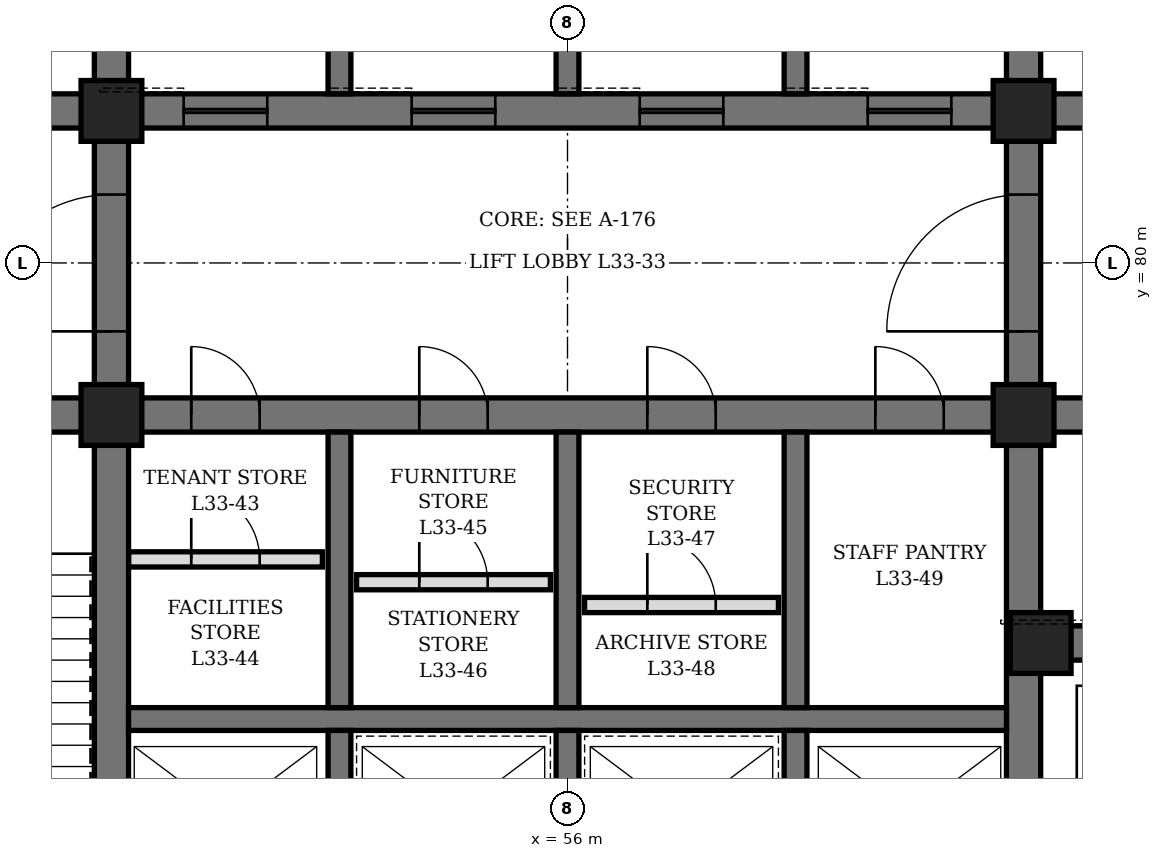
"""IFC4 building model, lengths in metres.
Left out: names, types, materials, properties, quantities, classifications, styles, units other than length and angle.
Written with IfcOpenShell. Run it as: python <this file> out.ifc"""

import sys

from ifc_helpers import new_model, si_unit, direction, frame, frame_2d, origin, origin_2d, place, context, subcontext, project, spatial, rectangle, hollow_rectangle, extrude, element, fill, save


model = new_model("IFC4")
c1 = context("Model", 3, precision=1e-05, world=origin(), true_north=direction((0.0, 1.0)))
c2 = subcontext(c1, "Body", "Model", "MODEL_VIEW")
j1 = project(units=[si_unit("LENGTHUNIT", "METRE"), si_unit("PLANEANGLEUNIT", "RADIAN")], contexts=[c1])
p1 = place(None, origin())
s1 = spatial("IfcSite", under=j1, at=p1, CompositionType="ELEMENT")
p2 = place(p1, origin())
s2 = spatial("IfcBuilding", under=s1, at=p2, CompositionType="ELEMENT")
p3 = place(p2, frame((0.0, 0.0, 150.1)))
s3 = spatial("IfcBuildingStorey", under=s2, at=p3, CompositionType="ELEMENT", Elevation=150.1)
p4 = place(p3, frame((50.0, 71.6, 0.0), z_axis=(0.0, 0.0, 1.0), x_axis=(0.0, 1.0, 0.0)))
e1 = element("IfcWall", 1, at=p4, inside=s3, PredefinedType="SHEAR", context=c2, shape_type="SweptSolid", body=[
    extrude(rectangle(XDim=16.8, YDim=0.45, at=frame_2d((8.4, 0.0))), origin(), (0.0, 0.0, 1.0), 4.2),
])
p5 = place(p4, frame((7.5, 0.0, 0.0)))
e2 = element("IfcOpeningElement", 2, at=p5, cuts=e1, PredefinedType="OPENING", context=c2, shape_type="SweptSolid", body=[
    extrude(rectangle(XDim=1.8, YDim=2.4, at=frame_2d((0.9, 1.2))), frame((0.0, 0.235, 0.0), z_axis=(0.0, -1.0, 0.0), x_axis=(1.0, 0.0, 0.0)), (0.0, 0.0, 1.0), 0.47),
])
p6 = place(p3, frame((62.0, 71.6, 0.0), z_axis=(0.0, 0.0, 1.0), x_axis=(0.0, 1.0, 0.0)))
e3 = element("IfcWall", 3, at=p6, inside=s3, PredefinedType="SHEAR", context=c2, shape_type="SweptSolid", body=[
    extrude(rectangle(XDim=16.8, YDim=0.45, at=frame_2d((8.4, 0.0))), origin(), (0.0, 0.0, 1.0), 4.2),
])
p7 = place(p6, frame((7.5, 0.0, 0.0)))
e4 = element("IfcOpeningElement", 4, at=p7, cuts=e3, PredefinedType="OPENING", context=c2, shape_type="SweptSolid", body=[
    extrude(rectangle(XDim=1.8, YDim=2.4, at=frame_2d((0.9, 1.2))), frame((0.0, 0.235, 0.0), z_axis=(0.0, -1.0, 0.0), x_axis=(1.0, 0.0, 0.0)), (0.0, 0.0, 1.0), 0.47),
])
p8 = place(p3, frame((44.6, 78.0, 0.0), z_axis=(0.0, 0.0, 1.0), x_axis=(1.0, 0.0, 0.0)))
e5 = element("IfcWall", 5, at=p8, inside=s3, PredefinedType="SHEAR", context=c2, shape_type="SweptSolid", body=[
    extrude(rectangle(XDim=5.175, YDim=0.45, at=frame_2d((2.587, 0.0))), origin(), (0.0, 0.0, 1.0), 4.2),
])
p9 = place(p8, frame((1.8, 0.0, 0.0)))
e6 = element("IfcOpeningElement", 6, at=p9, cuts=e5, PredefinedType="OPENING", context=c2, shape_type="SweptSolid", body=[
    extrude(rectangle(XDim=1.2, YDim=2.1, at=frame_2d((0.6, 1.05))), frame((0.0, 0.235, 0.0), z_axis=(0.0, -1.0, 0.0), x_axis=(1.0, 0.0, 0.0)), (0.0, 0.0, 1.0), 0.47),
])
p10 = place(p3, frame((44.6, 82.0, 0.0), z_axis=(0.0, 0.0, 1.0), x_axis=(1.0, 0.0, 0.0)))
e7 = element("IfcWall", 7, at=p10, inside=s3, PredefinedType="SHEAR", context=c2, shape_type="SweptSolid", body=[
    extrude(rectangle(XDim=5.175, YDim=0.45, at=frame_2d((2.587, 0.0))), origin(), (0.0, 0.0, 1.0), 4.2),
])
p11 = place(p10, frame((0.7, 0.0, 0.0)))
e8 = element("IfcOpeningElement", 8, at=p11, cuts=e7, PredefinedType="OPENING", context=c2, shape_type="SweptSolid", body=[
    extrude(rectangle(XDim=0.9, YDim=2.1, at=frame_2d((0.45, 1.05))), frame((0.0, 0.235, 0.0), z_axis=(0.0, -1.0, 0.0), x_axis=(1.0, 0.0, 0.0)), (0.0, 0.0, 1.0), 0.47),
])
p12 = place(p3, frame((62.225, 75.0, 0.0), z_axis=(0.0, 0.0, 1.0), x_axis=(1.0, 0.0, 0.0)))
e9 = element("IfcWall", 9, at=p12, inside=s3, PredefinedType="SHEAR", context=c2, shape_type="SweptSolid", body=[
    extrude(rectangle(XDim=5.175, YDim=0.45, at=frame_2d((2.587, 0.0))), origin(), (0.0, 0.0, 1.0), 4.2),
])
p13 = place(p12, frame((0.675, 0.0, 0.0)))
e10 = element("IfcOpeningElement", 10, at=p13, cuts=e9, PredefinedType="OPENING", context=c2, shape_type="SweptSolid", body=[
    extrude(rectangle(XDim=1.2, YDim=2.2, at=frame_2d((0.6, 1.1))), frame((0.0, 0.235, 0.0), z_axis=(0.0, -1.0, 0.0), x_axis=(1.0, 0.0, 0.0)), (0.0, 0.0, 1.0), 0.47),
])
p14 = place(p12, frame((3.425, 0.0, 0.0)))
e11 = element("IfcOpeningElement", 11, at=p14, cuts=e9, PredefinedType="OPENING", context=c2, shape_type="SweptSolid", body=[
    extrude(rectangle(XDim=1.2, YDim=2.2, at=frame_2d((0.6, 1.1))), frame((0.0, 0.235, 0.0), z_axis=(0.0, -1.0, 0.0), x_axis=(1.0, 0.0, 0.0)), (0.0, 0.0, 1.0), 0.47),
])
p15 = place(p3, frame((62.225, 78.0, 0.0), z_axis=(0.0, 0.0, 1.0), x_axis=(1.0, 0.0, 0.0)))
e12 = element("IfcWall", 12, at=p15, inside=s3, PredefinedType="SHEAR", context=c2, shape_type="SweptSolid", body=[
    extrude(rectangle(XDim=5.175, YDim=0.45, at=frame_2d((2.587, 0.0))), origin(), (0.0, 0.0, 1.0), 4.2),
])
p16 = place(p15, frame((2.175, 0.0, 0.0)))
e13 = element("IfcOpeningElement", 13, at=p16, cuts=e12, PredefinedType="OPENING", context=c2, shape_type="SweptSolid", body=[
    extrude(rectangle(XDim=1.2, YDim=2.1, at=frame_2d((0.6, 1.05))), frame((0.0, 0.235, 0.0), z_axis=(0.0, -1.0, 0.0), x_axis=(1.0, 0.0, 0.0)), (0.0, 0.0, 1.0), 0.47),
])
p17 = place(p3, frame((62.225, 82.0, 0.0), z_axis=(0.0, 0.0, 1.0), x_axis=(1.0, 0.0, 0.0)))
e14 = element("IfcWall", 14, at=p17, inside=s3, PredefinedType="SHEAR", context=c2, shape_type="SweptSolid", body=[
    extrude(rectangle(XDim=5.175, YDim=0.45, at=frame_2d((2.587, 0.0))), origin(), (0.0, 0.0, 1.0), 4.2),
])
p18 = place(p17, frame((2.175, 0.0, 0.0)))
e15 = element("IfcOpeningElement", 15, at=p18, cuts=e14, PredefinedType="OPENING", context=c2, shape_type="SweptSolid", body=[
    extrude(rectangle(XDim=1.2, YDim=2.1, at=frame_2d((0.6, 1.05))), frame((0.0, 0.235, 0.0), z_axis=(0.0, -1.0, 0.0), x_axis=(1.0, 0.0, 0.0)), (0.0, 0.0, 1.0), 0.47),
])
p19 = place(p3, frame((50.225, 78.0, 0.0), z_axis=(0.0, 0.0, 1.0), x_axis=(1.0, 0.0, 0.0)))
e16 = element("IfcWall", 16, at=p19, inside=s3, PredefinedType="SHEAR", context=c2, shape_type="SweptSolid", body=[
    extrude(rectangle(XDim=11.55, YDim=0.45, at=frame_2d((5.775, 0.0))), origin(), (0.0, 0.0, 1.0), 4.2),
])
p20 = place(p19, frame((0.825, 0.0, 0.0)))
e17 = element("IfcOpeningElement", 17, at=p20, cuts=e16, PredefinedType="OPENING", context=c2, shape_type="SweptSolid", body=[
    extrude(rectangle(XDim=0.9, YDim=2.1, at=frame_2d((0.45, 1.05))), frame((0.0, 0.235, 0.0), z_axis=(0.0, -1.0, 0.0), x_axis=(1.0, 0.0, 0.0)), (0.0, 0.0, 1.0), 0.47),
])
p21 = place(p19, frame((3.825, 0.0, 0.0)))
e18 = element("IfcOpeningElement", 18, at=p21, cuts=e16, PredefinedType="OPENING", context=c2, shape_type="SweptSolid", body=[
    extrude(rectangle(XDim=0.9, YDim=2.1, at=frame_2d((0.45, 1.05))), frame((0.0, 0.235, 0.0), z_axis=(0.0, -1.0, 0.0), x_axis=(1.0, 0.0, 0.0)), (0.0, 0.0, 1.0), 0.47),
])
p22 = place(p19, frame((6.825, 0.0, 0.0)))
e19 = element("IfcOpeningElement", 19, at=p22, cuts=e16, PredefinedType="OPENING", context=c2, shape_type="SweptSolid", body=[
    extrude(rectangle(XDim=0.9, YDim=2.1, at=frame_2d((0.45, 1.05))), frame((0.0, 0.235, 0.0), z_axis=(0.0, -1.0, 0.0), x_axis=(1.0, 0.0, 0.0)), (0.0, 0.0, 1.0), 0.47),
])
p23 = place(p19, frame((9.825, 0.0, 0.0)))
e20 = element("IfcOpeningElement", 20, at=p23, cuts=e16, PredefinedType="OPENING", context=c2, shape_type="SweptSolid", body=[
    extrude(rectangle(XDim=0.9, YDim=2.1, at=frame_2d((0.45, 1.05))), frame((0.0, 0.235, 0.0), z_axis=(0.0, -1.0, 0.0), x_axis=(1.0, 0.0, 0.0)), (0.0, 0.0, 1.0), 0.47),
])
p24 = place(p3, frame((50.225, 82.0, 0.0), z_axis=(0.0, 0.0, 1.0), x_axis=(1.0, 0.0, 0.0)))
e21 = element("IfcWall", 21, at=p24, inside=s3, PredefinedType="SHEAR", context=c2, shape_type="SweptSolid", body=[
    extrude(rectangle(XDim=11.55, YDim=0.45, at=frame_2d((5.775, 0.0))), origin(), (0.0, 0.0, 1.0), 4.2),
])
p25 = place(p24, frame((0.725, 0.0, 0.0)))
e22 = element("IfcOpeningElement", 22, at=p25, cuts=e21, PredefinedType="OPENING", context=c2, shape_type="SweptSolid", body=[
    extrude(rectangle(XDim=1.1, YDim=2.2, at=frame_2d((0.55, 1.1))), frame((0.0, 0.235, 0.0), z_axis=(0.0, -1.0, 0.0), x_axis=(1.0, 0.0, 0.0)), (0.0, 0.0, 1.0), 0.47),
])
p26 = place(p24, frame((3.725, 0.0, 0.0)))
e23 = element("IfcOpeningElement", 23, at=p26, cuts=e21, PredefinedType="OPENING", context=c2, shape_type="SweptSolid", body=[
    extrude(rectangle(XDim=1.1, YDim=2.2, at=frame_2d((0.55, 1.1))), frame((0.0, 0.235, 0.0), z_axis=(0.0, -1.0, 0.0), x_axis=(1.0, 0.0, 0.0)), (0.0, 0.0, 1.0), 0.47),
])
p27 = place(p24, frame((6.725, 0.0, 0.0)))
e24 = element("IfcOpeningElement", 24, at=p27, cuts=e21, PredefinedType="OPENING", context=c2, shape_type="SweptSolid", body=[
    extrude(rectangle(XDim=1.1, YDim=2.2, at=frame_2d((0.55, 1.1))), frame((0.0, 0.235, 0.0), z_axis=(0.0, -1.0, 0.0), x_axis=(1.0, 0.0, 0.0)), (0.0, 0.0, 1.0), 0.47),
])
p28 = place(p24, frame((9.725, 0.0, 0.0)))
e25 = element("IfcOpeningElement", 25, at=p28, cuts=e21, PredefinedType="OPENING", context=c2, shape_type="SweptSolid", body=[
    extrude(rectangle(XDim=1.1, YDim=2.2, at=frame_2d((0.55, 1.1))), frame((0.0, 0.235, 0.0), z_axis=(0.0, -1.0, 0.0), x_axis=(1.0, 0.0, 0.0)), (0.0, 0.0, 1.0), 0.47),
])
p29 = place(p3, frame((50.225, 74.0, 0.0), z_axis=(0.0, 0.0, 1.0), x_axis=(1.0, 0.0, 0.0)))
e26 = element("IfcWall", 26, at=p29, inside=s3, PredefinedType="SHEAR", context=c2, shape_type="SweptSolid", body=[
    extrude(rectangle(XDim=11.55, YDim=0.3, at=frame_2d((5.775, 0.0))), origin(), (0.0, 0.0, 1.0), 4.2),
])
p30 = place(p3, frame((53.0, 71.6, 0.0), z_axis=(0.0, 0.0, 1.0), x_axis=(0.0, 1.0, 0.0)))
e27 = element("IfcWall", 27, at=p30, inside=s3, PredefinedType="SHEAR", context=c2, shape_type="SweptSolid", body=[
    extrude(rectangle(XDim=2.25, YDim=0.3, at=frame_2d((1.125, 0.0))), origin(), (0.0, 0.0, 1.0), 4.2),
])
p31 = place(p3, frame((53.0, 74.15, 0.0), z_axis=(0.0, 0.0, 1.0), x_axis=(0.0, 1.0, 0.0)))
e28 = element("IfcWall", 28, at=p31, inside=s3, PredefinedType="SHEAR", context=c2, shape_type="SweptSolid", body=[
    extrude(rectangle(XDim=3.625, YDim=0.3, at=frame_2d((1.812, 0.0))), origin(), (0.0, 0.0, 1.0), 4.2),
])
p32 = place(p3, frame((53.0, 82.225, 0.0), z_axis=(0.0, 0.0, 1.0), x_axis=(0.0, 1.0, 0.0)))
e29 = element("IfcWall", 29, at=p32, inside=s3, PredefinedType="SHEAR", context=c2, shape_type="SweptSolid", body=[
    extrude(rectangle(XDim=3.55, YDim=0.3, at=frame_2d((1.775, 0.0))), origin(), (0.0, 0.0, 1.0), 4.2),
])
p33 = place(p3, frame((56.0, 71.6, 0.0), z_axis=(0.0, 0.0, 1.0), x_axis=(0.0, 1.0, 0.0)))
e30 = element("IfcWall", 30, at=p33, inside=s3, PredefinedType="SHEAR", context=c2, shape_type="SweptSolid", body=[
    extrude(rectangle(XDim=2.25, YDim=0.3, at=frame_2d((1.125, 0.0))), origin(), (0.0, 0.0, 1.0), 4.2),
])
p34 = place(p3, frame((56.0, 74.15, 0.0), z_axis=(0.0, 0.0, 1.0), x_axis=(0.0, 1.0, 0.0)))
e31 = element("IfcWall", 31, at=p34, inside=s3, PredefinedType="SHEAR", context=c2, shape_type="SweptSolid", body=[
    extrude(rectangle(XDim=3.625, YDim=0.3, at=frame_2d((1.812, 0.0))), origin(), (0.0, 0.0, 1.0), 4.2),
])
p35 = place(p3, frame((56.0, 82.225, 0.0), z_axis=(0.0, 0.0, 1.0), x_axis=(0.0, 1.0, 0.0)))
e32 = element("IfcWall", 32, at=p35, inside=s3, PredefinedType="SHEAR", context=c2, shape_type="SweptSolid", body=[
    extrude(rectangle(XDim=3.55, YDim=0.3, at=frame_2d((1.775, 0.0))), origin(), (0.0, 0.0, 1.0), 4.2),
])
p36 = place(p3, frame((59.0, 71.6, 0.0), z_axis=(0.0, 0.0, 1.0), x_axis=(0.0, 1.0, 0.0)))
e33 = element("IfcWall", 33, at=p36, inside=s3, PredefinedType="SHEAR", context=c2, shape_type="SweptSolid", body=[
    extrude(rectangle(XDim=2.25, YDim=0.3, at=frame_2d((1.125, 0.0))), origin(), (0.0, 0.0, 1.0), 4.2),
])
p37 = place(p3, frame((59.0, 74.15, 0.0), z_axis=(0.0, 0.0, 1.0), x_axis=(0.0, 1.0, 0.0)))
e34 = element("IfcWall", 34, at=p37, inside=s3, PredefinedType="SHEAR", context=c2, shape_type="SweptSolid", body=[
    extrude(rectangle(XDim=3.625, YDim=0.3, at=frame_2d((1.812, 0.0))), origin(), (0.0, 0.0, 1.0), 4.2),
])
p38 = place(p3, frame((59.0, 82.225, 0.0), z_axis=(0.0, 0.0, 1.0), x_axis=(0.0, 1.0, 0.0)))
e35 = element("IfcWall", 35, at=p38, inside=s3, PredefinedType="SHEAR", context=c2, shape_type="SweptSolid", body=[
    extrude(rectangle(XDim=3.55, YDim=0.3, at=frame_2d((1.775, 0.0))), origin(), (0.0, 0.0, 1.0), 4.2),
])
for number, where, z_axis, x_axis in (
    (36, (50.0, 78.0, 0.0), (0.0, 0.0, 1.0), (1.0, 0.0, 0.0)),
    (37, (50.0, 82.0, 0.0), (0.0, 0.0, 1.0), (1.0, 0.0, 0.0)),
    (38, (62.0, 78.0, 0.0), (0.0, 0.0, 1.0), (1.0, 0.0, 0.0)),
    (39, (62.0, 82.0, 0.0), (0.0, 0.0, 1.0), (1.0, 0.0, 0.0)),
    (40, (62.225, 75.0, 0.0), (0.0, 0.0, 1.0), (1.0, 0.0, 0.0)),
):
    element("IfcColumn", number, at=place(p3, frame(where, z_axis=z_axis, x_axis=x_axis)), inside=s3, PredefinedType="COLUMN", context=c2, shape_type="SweptSolid", body=[
        extrude(hollow_rectangle(XDim=0.8, YDim=0.8, WallThickness=0.1, at=origin_2d()), origin(), (0.0, 0.0, 1.0), 4.2),
    ])
p39 = place(p3, frame((50.225, 76.1, 0.0), z_axis=(0.0, 0.0, 1.0), x_axis=(1.0, 0.0, 0.0)))
e41 = element("IfcWall", 41, at=p39, inside=s3, PredefinedType="PARTITIONING", context=c2, shape_type="SweptSolid", body=[
    extrude(rectangle(XDim=2.55, YDim=0.2, at=frame_2d((1.275, 0.0))), origin(), (0.0, 0.0, 1.0), 4.04),
])
p40 = place(p39, frame((0.825, 0.0, 0.0)))
e42 = element("IfcOpeningElement", 42, at=p40, cuts=e41, PredefinedType="OPENING", context=c2, shape_type="SweptSolid", body=[
    extrude(rectangle(XDim=0.9, YDim=2.1, at=frame_2d((0.45, 1.05))), frame((0.0, 0.11, 0.0), z_axis=(0.0, -1.0, 0.0), x_axis=(1.0, 0.0, 0.0)), (0.0, 0.0, 1.0), 0.22),
])
p41 = place(p3, frame((53.225, 75.8, 0.0), z_axis=(0.0, 0.0, 1.0), x_axis=(1.0, 0.0, 0.0)))
e43 = element("IfcWall", 43, at=p41, inside=s3, PredefinedType="PARTITIONING", context=c2, shape_type="SweptSolid", body=[
    extrude(rectangle(XDim=2.55, YDim=0.2, at=frame_2d((1.275, 0.0))), origin(), (0.0, 0.0, 1.0), 4.04),
])
p42 = place(p41, frame((0.825, 0.0, 0.0)))
e44 = element("IfcOpeningElement", 44, at=p42, cuts=e43, PredefinedType="OPENING", context=c2, shape_type="SweptSolid", body=[
    extrude(rectangle(XDim=0.9, YDim=2.1, at=frame_2d((0.45, 1.05))), frame((0.0, 0.11, 0.0), z_axis=(0.0, -1.0, 0.0), x_axis=(1.0, 0.0, 0.0)), (0.0, 0.0, 1.0), 0.22),
])
p43 = place(p3, frame((56.225, 75.5, 0.0), z_axis=(0.0, 0.0, 1.0), x_axis=(1.0, 0.0, 0.0)))
e45 = element("IfcWall", 45, at=p43, inside=s3, PredefinedType="PARTITIONING", context=c2, shape_type="SweptSolid", body=[
    extrude(rectangle(XDim=2.55, YDim=0.2, at=frame_2d((1.275, 0.0))), origin(), (0.0, 0.0, 1.0), 4.04),
])
p44 = place(p43, frame((0.825, 0.0, 0.0)))
e46 = element("IfcOpeningElement", 46, at=p44, cuts=e45, PredefinedType="OPENING", context=c2, shape_type="SweptSolid", body=[
    extrude(rectangle(XDim=0.9, YDim=2.1, at=frame_2d((0.45, 1.05))), frame((0.0, 0.11, 0.0), z_axis=(0.0, -1.0, 0.0), x_axis=(1.0, 0.0, 0.0)), (0.0, 0.0, 1.0), 0.22),
])
p45 = place(p20, origin())
e47 = element("IfcDoor", 47, at=p45, inside=s3, OperationType="SINGLE_SWING_LEFT", PredefinedType="DOOR", context=c2, shape_type="SweptSolid", body=[
    extrude(rectangle(XDim=0.9, YDim=2.1, at=frame_2d((0.45, 1.05))), frame((0.0, 0.225, 0.0), z_axis=(0.0, -1.0, 0.0), x_axis=(1.0, 0.0, 0.0)), (0.0, 0.0, 1.0), 0.449),
])
fill(e17, e47)
p46 = place(p40, origin())
e48 = element("IfcDoor", 48, at=p46, inside=s3, OperationType="SINGLE_SWING_LEFT", PredefinedType="DOOR", context=c2, shape_type="SweptSolid", body=[
    extrude(rectangle(XDim=0.9, YDim=2.1, at=frame_2d((0.45, 1.05))), frame((0.0, 0.1, 0.0), z_axis=(0.0, -1.0, 0.0), x_axis=(1.0, 0.0, 0.0)), (0.0, 0.0, 1.0), 0.199),
])
fill(e42, e48)
p47 = place(p21, origin())
e49 = element("IfcDoor", 49, at=p47, inside=s3, OperationType="SINGLE_SWING_LEFT", PredefinedType="DOOR", context=c2, shape_type="SweptSolid", body=[
    extrude(rectangle(XDim=0.9, YDim=2.1, at=frame_2d((0.45, 1.05))), frame((0.0, 0.225, 0.0), z_axis=(0.0, -1.0, 0.0), x_axis=(1.0, 0.0, 0.0)), (0.0, 0.0, 1.0), 0.449),
])
fill(e18, e49)
p48 = place(p42, origin())
e50 = element("IfcDoor", 50, at=p48, inside=s3, OperationType="SINGLE_SWING_LEFT", PredefinedType="DOOR", context=c2, shape_type="SweptSolid", body=[
    extrude(rectangle(XDim=0.9, YDim=2.1, at=frame_2d((0.45, 1.05))), frame((0.0, 0.1, 0.0), z_axis=(0.0, -1.0, 0.0), x_axis=(1.0, 0.0, 0.0)), (0.0, 0.0, 1.0), 0.199),
])
fill(e44, e50)
p49 = place(p22, origin())
e51 = element("IfcDoor", 51, at=p49, inside=s3, OperationType="SINGLE_SWING_LEFT", PredefinedType="DOOR", context=c2, shape_type="SweptSolid", body=[
    extrude(rectangle(XDim=0.9, YDim=2.1, at=frame_2d((0.45, 1.05))), frame((0.0, 0.225, 0.0), z_axis=(0.0, -1.0, 0.0), x_axis=(1.0, 0.0, 0.0)), (0.0, 0.0, 1.0), 0.449),
])
fill(e19, e51)
p50 = place(p44, origin())
e52 = element("IfcDoor", 52, at=p50, inside=s3, OperationType="SINGLE_SWING_LEFT", PredefinedType="DOOR", context=c2, shape_type="SweptSolid", body=[
    extrude(rectangle(XDim=0.9, YDim=2.1, at=frame_2d((0.45, 1.05))), frame((0.0, 0.1, 0.0), z_axis=(0.0, -1.0, 0.0), x_axis=(1.0, 0.0, 0.0)), (0.0, 0.0, 1.0), 0.199),
])
fill(e46, e52)
p51 = place(p23, origin())
e53 = element("IfcDoor", 53, at=p51, inside=s3, OperationType="SINGLE_SWING_LEFT", PredefinedType="DOOR", context=c2, shape_type="SweptSolid", body=[
    extrude(rectangle(XDim=0.9, YDim=2.1, at=frame_2d((0.45, 1.05))), frame((0.0, 0.225, 0.0), z_axis=(0.0, -1.0, 0.0), x_axis=(1.0, 0.0, 0.0)), (0.0, 0.0, 1.0), 0.449),
])
fill(e20, e53)
p52 = place(p5, origin())
e54 = element("IfcDoor", 54, at=p52, inside=s3, OperationType="DOUBLE_DOOR_SINGLE_SWING", PredefinedType="DOOR", context=c2, shape_type="SweptSolid", body=[
    extrude(rectangle(XDim=1.8, YDim=2.4, at=frame_2d((0.9, 1.2))), frame((0.0, 0.225, 0.0), z_axis=(0.0, -1.0, 0.0), x_axis=(1.0, 0.0, 0.0)), (0.0, 0.0, 1.0), 0.449),
])
fill(e2, e54)
p53 = place(p7, origin())
e55 = element("IfcDoor", 55, at=p53, inside=s3, OperationType="DOUBLE_DOOR_SINGLE_SWING", PredefinedType="DOOR", context=c2, shape_type="SweptSolid", body=[
    extrude(rectangle(XDim=1.8, YDim=2.4, at=frame_2d((0.9, 1.2))), frame((0.0, 0.225, 0.0), z_axis=(0.0, -1.0, 0.0), x_axis=(1.0, 0.0, 0.0)), (0.0, 0.0, 1.0), 0.449),
])
fill(e4, e55)
p54 = place(p25, origin())
e56 = element("IfcDoor", 56, at=p54, inside=s3, OperationType="SLIDING_TO_LEFT", PredefinedType="DOOR", context=c2, shape_type="SweptSolid", body=[
    extrude(rectangle(XDim=1.1, YDim=2.2, at=frame_2d((0.55, 1.1))), frame((0.0, 0.225, 0.0), z_axis=(0.0, -1.0, 0.0), x_axis=(1.0, 0.0, 0.0)), (0.0, 0.0, 1.0), 0.449),
])
fill(e22, e56)
p55 = place(p26, origin())
e57 = element("IfcDoor", 57, at=p55, inside=s3, OperationType="SLIDING_TO_LEFT", PredefinedType="DOOR", context=c2, shape_type="SweptSolid", body=[
    extrude(rectangle(XDim=1.1, YDim=2.2, at=frame_2d((0.55, 1.1))), frame((0.0, 0.225, 0.0), z_axis=(0.0, -1.0, 0.0), x_axis=(1.0, 0.0, 0.0)), (0.0, 0.0, 1.0), 0.449),
])
fill(e23, e57)
p56 = place(p27, origin())
e58 = element("IfcDoor", 58, at=p56, inside=s3, OperationType="SLIDING_TO_LEFT", PredefinedType="DOOR", context=c2, shape_type="SweptSolid", body=[
    extrude(rectangle(XDim=1.1, YDim=2.2, at=frame_2d((0.55, 1.1))), frame((0.0, 0.225, 0.0), z_axis=(0.0, -1.0, 0.0), x_axis=(1.0, 0.0, 0.0)), (0.0, 0.0, 1.0), 0.449),
])
fill(e24, e58)
p57 = place(p28, origin())
e59 = element("IfcDoor", 59, at=p57, inside=s3, OperationType="SLIDING_TO_LEFT", PredefinedType="DOOR", context=c2, shape_type="SweptSolid", body=[
    extrude(rectangle(XDim=1.1, YDim=2.2, at=frame_2d((0.55, 1.1))), frame((0.0, 0.225, 0.0), z_axis=(0.0, -1.0, 0.0), x_axis=(1.0, 0.0, 0.0)), (0.0, 0.0, 1.0), 0.449),
])
fill(e25, e59)
save(model, sys.argv[1])
